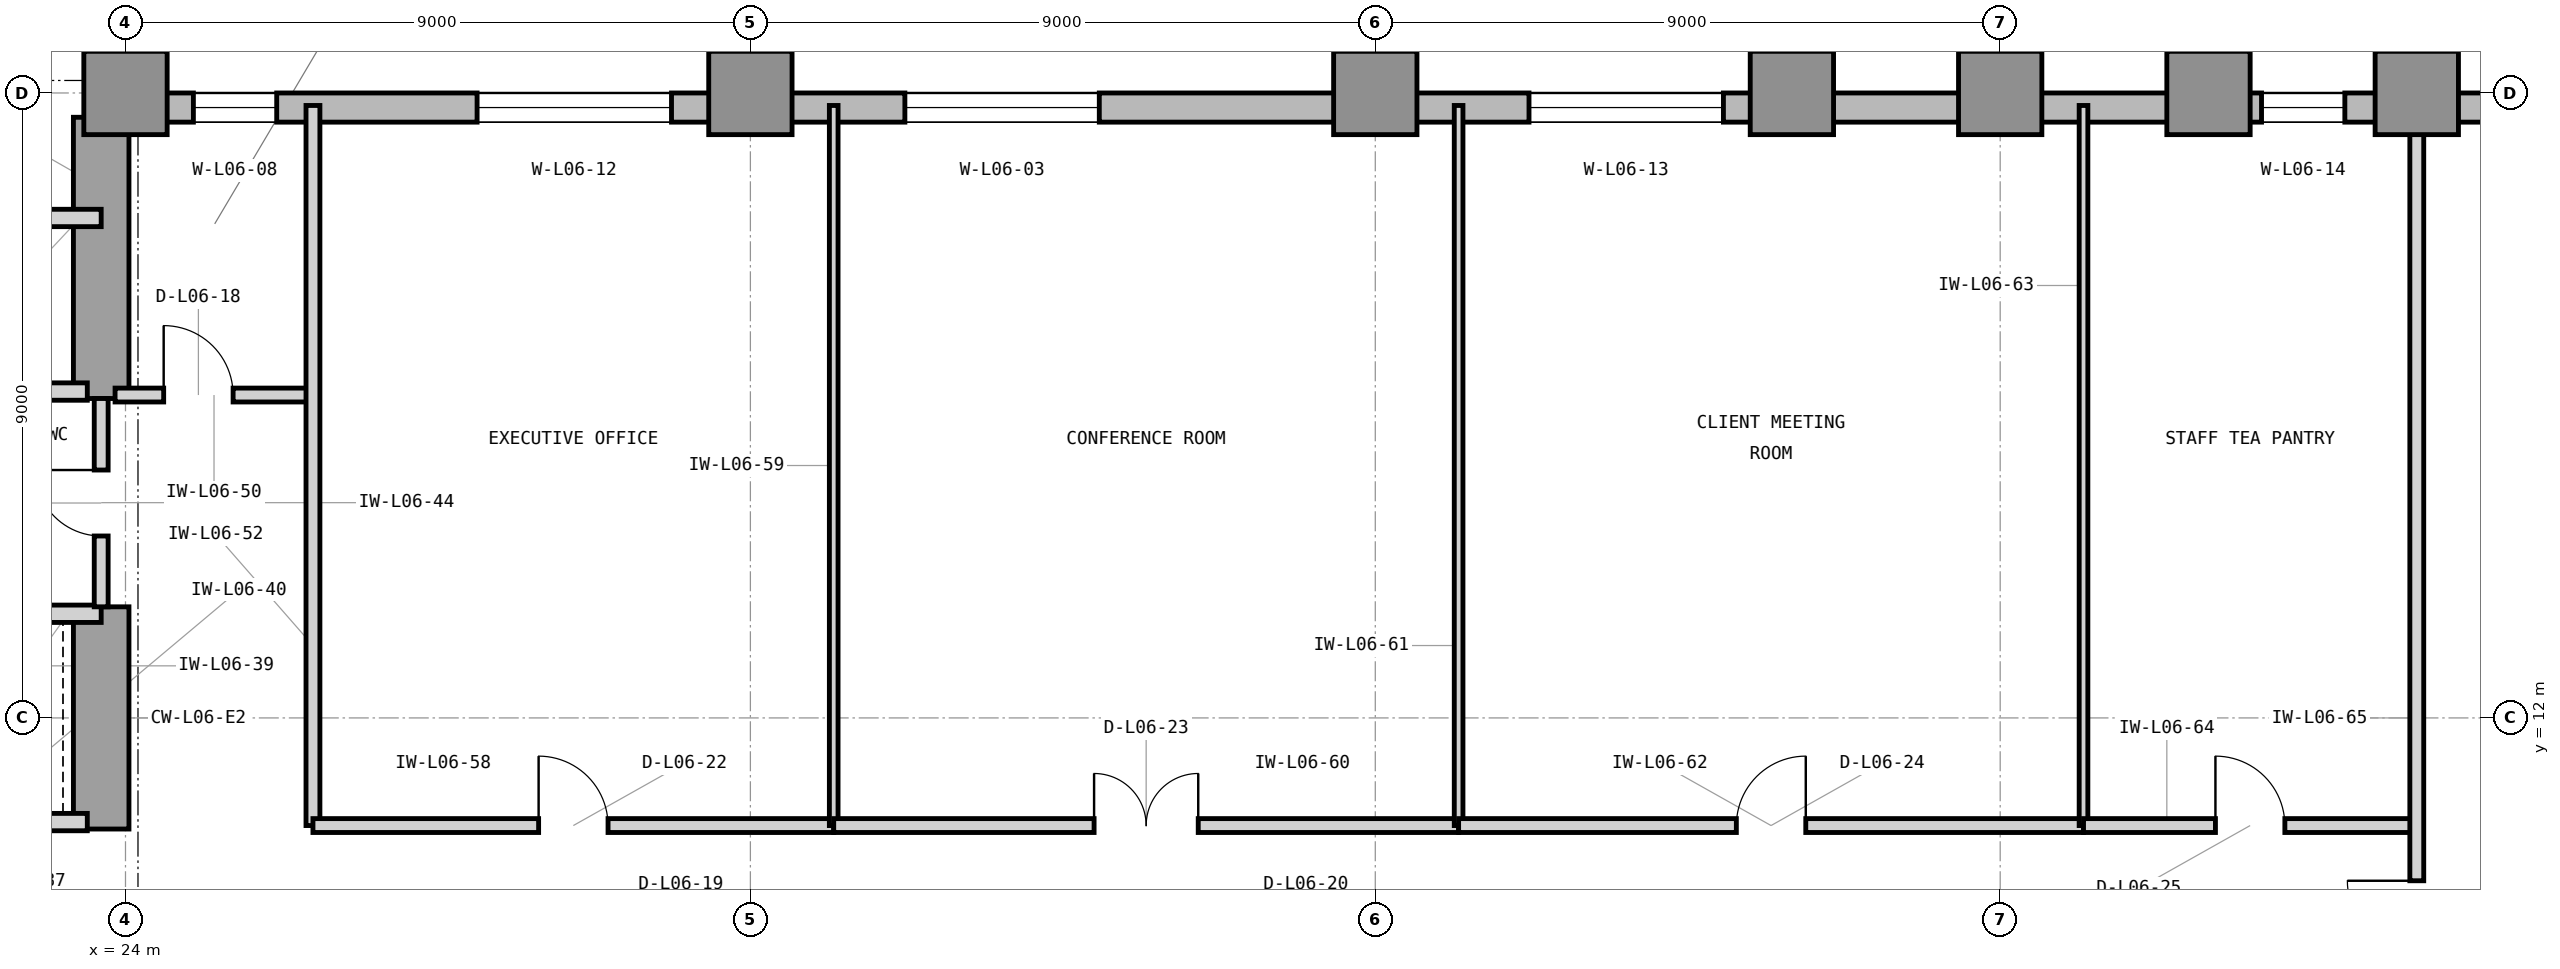
"""IFC4 building model, lengths in metres.
Left out: names, types, materials, properties, quantities, classifications, styles, units other than length and angle.
Written with IfcOpenShell. Run it as: python <this file> out.ifc"""

import sys

from ifc_helpers import new_model, si_unit, direction, frame, frame_2d, origin, origin_2d, place, context, subcontext, project, spatial, rectangle, extrude, element, fill, save


model = new_model("IFC4")
c1 = context("Model", 3, precision=1e-05, world=origin(), true_north=direction((0.0, 1.0)))
c2 = subcontext(c1, "Body", "Model", "MODEL_VIEW")
j1 = project(units=[si_unit("LENGTHUNIT", "METRE"), si_unit("PLANEANGLEUNIT", "RADIAN")], contexts=[c1])
p1 = place(None, origin())
s1 = spatial("IfcSite", under=j1, at=p1, CompositionType="ELEMENT")
p2 = place(p1, origin())
s2 = spatial("IfcBuilding", under=s1, at=p2, CompositionType="ELEMENT")
p3 = place(p2, frame((0.0, 0.0, 30.0)))
s3 = spatial("IfcBuildingStorey", under=s2, at=p3, CompositionType="ELEMENT", Elevation=30.0)
p4 = place(p3, frame((23.65, 10.4, 0.0), z_axis=(0.0, 0.0, 1.0), x_axis=(0.0, 1.0, 0.0)))
e1 = element("IfcWall", 1, at=p4, inside=s3, PredefinedType="SHEAR", context=c2, shape_type="SweptSolid", body=[
    extrude(rectangle(XDim=3.2, YDim=0.8, at=frame_2d((1.6, 0.0))), origin(), (0.0, 0.0, 1.0), 4.2),
])
p5 = place(p3, frame((23.65, 16.6, 0.0), z_axis=(0.0, 0.0, 1.0), x_axis=(0.0, 1.0, 0.0)))
e2 = element("IfcWall", 2, at=p5, inside=s3, PredefinedType="SHEAR", context=c2, shape_type="SweptSolid", body=[
    extrude(rectangle(XDim=4.05, YDim=0.8, at=frame_2d((2.025, 0.0))), origin(), (0.0, 0.0, 1.0), 4.2),
])
for number, where, z_axis, x_axis in (
    (3, (24.0, 21.0, 0.0), (0.0, 0.0, 1.0), (1.0, 0.0, 0.0)),
    (4, (33.0, 21.0, 0.0), (0.0, 0.0, 1.0), (1.0, 0.0, 0.0)),
    (5, (42.0, 21.0, 0.0), (0.0, 0.0, 1.0), (1.0, 0.0, 0.0)),
    (6, (48.0, 21.0, 0.0), (0.0, 0.0, 1.0), (1.0, 0.0, 0.0)),
    (7, (51.0, 21.0, 0.0), (0.0, 0.0, 1.0), (1.0, 0.0, 0.0)),
    (8, (54.0, 21.0, 0.0), (0.0, 0.0, 1.0), (1.0, 0.0, 0.0)),
    (9, (57.0, 21.0, 0.0), (0.0, 0.0, 1.0), (1.0, 0.0, 0.0)),
):
    element("IfcColumn", number, at=place(p3, frame(where, z_axis=z_axis, x_axis=x_axis)), inside=s3, PredefinedType="COLUMN", context=c2, shape_type="SweptSolid", body=[
        extrude(rectangle(XDim=1.2, YDim=1.2, at=origin_2d()), origin(), (0.0, 0.0, 1.0), 4.2),
    ])
p6 = place(p3, frame((64.4, 20.79, 0.0), z_axis=(0.0, 0.0, 1.0), x_axis=(-1.0, 0.0, 0.0)))
e10 = element("IfcWall", 10, at=p6, inside=s3, PredefinedType="STANDARD", context=c2, shape_type="SweptSolid", body=[
    extrude(rectangle(XDim=40.4, YDim=0.42, at=frame_2d((20.2, 0.0))), origin(), (0.0, 0.0, 1.0), 3.98),
])
p7 = place(p6, frame((26.375, 0.0, 0.85)))
e11 = element("IfcOpeningElement", 11, at=p7, cuts=e10, PredefinedType="OPENING", context=c2, shape_type="SweptSolid", body=[
    extrude(rectangle(XDim=2.8, YDim=2.45, at=frame_2d((1.4, 1.225))), frame((0.0, 0.22, 0.0), z_axis=(0.0, -1.0, 0.0), x_axis=(1.0, 0.0, 0.0)), (0.0, 0.0, 1.0), 0.44),
])
p8 = place(p6, frame((38.222, 0.0, 0.85)))
e12 = element("IfcOpeningElement", 12, at=p8, cuts=e10, PredefinedType="OPENING", context=c2, shape_type="SweptSolid", body=[
    extrude(rectangle(XDim=1.2, YDim=2.45, at=frame_2d((0.6, 1.225))), frame((0.0, 0.22, 0.0), z_axis=(0.0, -1.0, 0.0), x_axis=(1.0, 0.0, 0.0)), (0.0, 0.0, 1.0), 0.44),
])
p9 = place(p6, frame((32.536, 0.0, 0.85)))
e13 = element("IfcOpeningElement", 13, at=p9, cuts=e10, PredefinedType="OPENING", context=c2, shape_type="SweptSolid", body=[
    extrude(rectangle(XDim=2.8, YDim=2.45, at=frame_2d((1.4, 1.225))), frame((0.0, 0.22, 0.0), z_axis=(0.0, -1.0, 0.0), x_axis=(1.0, 0.0, 0.0)), (0.0, 0.0, 1.0), 0.44),
])
p10 = place(p6, frame((17.386, 0.0, 0.85)))
e14 = element("IfcOpeningElement", 14, at=p10, cuts=e10, PredefinedType="OPENING", context=c2, shape_type="SweptSolid", body=[
    extrude(rectangle(XDim=2.8, YDim=2.45, at=frame_2d((1.4, 1.225))), frame((0.0, 0.22, 0.0), z_axis=(0.0, -1.0, 0.0), x_axis=(1.0, 0.0, 0.0)), (0.0, 0.0, 1.0), 0.44),
])
p11 = place(p6, frame((8.436, 0.0, 0.85)))
e15 = element("IfcOpeningElement", 15, at=p11, cuts=e10, PredefinedType="OPENING", context=c2, shape_type="SweptSolid", body=[
    extrude(rectangle(XDim=1.2, YDim=2.45, at=frame_2d((0.6, 1.225))), frame((0.0, 0.22, 0.0), z_axis=(0.0, -1.0, 0.0), x_axis=(1.0, 0.0, 0.0)), (0.0, 0.0, 1.0), 0.44),
])
p12 = place(p3, frame((23.79, 21.0, 0.0), z_axis=(0.0, 0.0, 1.0), x_axis=(0.0, 1.0, 0.0)))
e16 = element("IfcWall", 16, at=p12, inside=s3, PredefinedType="STANDARD", context=c2, shape_type="SweptSolid", body=[
    extrude(rectangle(XDim=28.4, YDim=0.42, at=frame_2d((14.2, 0.0))), origin(), (0.0, 0.0, 1.0), 3.98),
])
p13 = place(p12, frame((10.433, 0.0, 0.85)))
e17 = element("IfcOpeningElement", 17, at=p13, cuts=e16, PredefinedType="OPENING", context=c2, shape_type="SweptSolid", body=[
    extrude(rectangle(XDim=2.8, YDim=2.45, at=frame_2d((1.4, 1.225))), frame((0.0, 0.22, 0.0), z_axis=(0.0, -1.0, 0.0), x_axis=(1.0, 0.0, 0.0)), (0.0, 0.0, 1.0), 0.44),
])
p14 = place(p12, frame((21.966, 0.0, 0.85)))
e18 = element("IfcOpeningElement", 18, at=p14, cuts=e16, PredefinedType="OPENING", context=c2, shape_type="SweptSolid", body=[
    extrude(rectangle(XDim=1.2, YDim=2.45, at=frame_2d((0.6, 1.225))), frame((0.0, 0.22, 0.0), z_axis=(0.0, -1.0, 0.0), x_axis=(1.0, 0.0, 0.0)), (0.0, 0.0, 1.0), 0.44),
])
p15 = place(p3, frame((21.05, 16.7, 0.0), z_axis=(0.0, 0.0, 1.0), x_axis=(1.0, 0.0, 0.0)))
e19 = element("IfcWall", 19, at=p15, inside=s3, PredefinedType="PARTITIONING", context=c2, shape_type="SweptSolid", body=[
    extrude(rectangle(XDim=2.4, YDim=0.25, at=frame_2d((1.2, 0.0))), origin(), (0.0, 0.0, 1.0), 3.426),
])
p16 = place(p3, frame((16.45, 19.2, 0.0), z_axis=(0.0, 0.0, 1.0), x_axis=(1.0, 0.0, 0.0)))
e20 = element("IfcWall", 20, at=p16, inside=s3, PredefinedType="PARTITIONING", context=c2, shape_type="SweptSolid", body=[
    extrude(rectangle(XDim=7.2, YDim=0.25, at=frame_2d((3.6, 0.0))), origin(), (0.0, 0.0, 1.0), 3.97),
])
p17 = place(p3, frame((21.05, 10.5, 0.0), z_axis=(0.0, 0.0, 1.0), x_axis=(1.0, 0.0, 0.0)))
e21 = element("IfcWall", 21, at=p17, inside=s3, PredefinedType="PARTITIONING", context=c2, shape_type="SweptSolid", body=[
    extrude(rectangle(XDim=2.4, YDim=0.25, at=frame_2d((1.2, 0.0))), origin(), (0.0, 0.0, 1.0), 3.426),
])
p18 = place(p3, frame((14.7, 13.5, 0.0), z_axis=(0.0, 0.0, 1.0), x_axis=(1.0, 0.0, 0.0)))
e22 = element("IfcWall", 22, at=p18, inside=s3, PredefinedType="PARTITIONING", context=c2, shape_type="SweptSolid", body=[
    extrude(rectangle(XDim=8.95, YDim=0.25, at=frame_2d((4.475, 0.0))), origin(), (0.0, 0.0, 1.0), 3.426),
])
p19 = place(p3, frame((23.65, 13.6, 0.0), z_axis=(0.0, 0.0, 1.0), x_axis=(0.0, 1.0, 0.0)))
e23 = element("IfcWall", 23, at=p19, inside=s3, PredefinedType="PARTITIONING", context=c2, shape_type="SweptSolid", body=[
    extrude(rectangle(XDim=3.0, YDim=0.2, at=frame_2d((1.5, 0.0))), origin(), (0.0, 0.0, 1.0), 3.97),
])
p20 = place(p19, frame((1.02, 0.0, 0.0)))
e24 = element("IfcOpeningElement", 24, at=p20, cuts=e23, PredefinedType="OPENING", context=c2, shape_type="SweptSolid", body=[
    extrude(rectangle(XDim=0.95, YDim=2.1, at=frame_2d((0.475, 1.05))), frame((0.0, 0.11, 0.0), z_axis=(0.0, -1.0, 0.0), x_axis=(1.0, 0.0, 0.0)), (0.0, 0.0, 1.0), 0.22),
])
p21 = place(p3, frame((23.85, 16.65, 0.0), z_axis=(0.0, 0.0, 1.0), x_axis=(1.0, 0.0, 0.0)))
e25 = element("IfcWall", 25, at=p21, inside=s3, PredefinedType="PARTITIONING", context=c2, shape_type="SweptSolid", body=[
    extrude(rectangle(XDim=2.85, YDim=0.2, at=frame_2d((1.425, 0.0))), origin(), (0.0, 0.0, 1.0), 3.97),
])
p22 = place(p21, frame((0.7, 0.0, 0.0)))
e26 = element("IfcOpeningElement", 26, at=p22, cuts=e25, PredefinedType="OPENING", context=c2, shape_type="SweptSolid", body=[
    extrude(rectangle(XDim=1.0, YDim=2.15, at=frame_2d((0.5, 1.075))), frame((0.0, 0.11, 0.0), z_axis=(0.0, -1.0, 0.0), x_axis=(1.0, 0.0, 0.0)), (0.0, 0.0, 1.0), 0.22),
])
p23 = place(p3, frame((26.7, 10.45, 0.0), z_axis=(0.0, 0.0, 1.0), x_axis=(0.0, 1.0, 0.0)))
e27 = element("IfcWall", 27, at=p23, inside=s3, PredefinedType="PARTITIONING", context=c2, shape_type="SweptSolid", body=[
    extrude(rectangle(XDim=10.37, YDim=0.2, at=frame_2d((5.185, 0.0))), origin(), (0.0, 0.0, 1.0), 3.97),
])
p24 = place(p3, frame((26.7, 10.45, 0.0), z_axis=(0.0, 0.0, 1.0), x_axis=(1.0, 0.0, 0.0)))
e28 = element("IfcWall", 28, at=p24, inside=s3, PredefinedType="PARTITIONING", context=c2, shape_type="SweptSolid", body=[
    extrude(rectangle(XDim=7.5, YDim=0.2, at=frame_2d((3.75, 0.0))), origin(), (0.0, 0.0, 1.0), 3.97),
])
p25 = place(p24, frame((3.25, 0.0, 0.0)))
e29 = element("IfcOpeningElement", 29, at=p25, cuts=e28, PredefinedType="OPENING", context=c2, shape_type="SweptSolid", body=[
    extrude(rectangle(XDim=1.0, YDim=2.15, at=frame_2d((0.5, 1.075))), frame((0.0, 0.11, 0.0), z_axis=(0.0, -1.0, 0.0), x_axis=(1.0, 0.0, 0.0)), (0.0, 0.0, 1.0), 0.22),
])
p26 = place(p3, frame((34.2, 10.45, 0.0), z_axis=(0.0, 0.0, 1.0), x_axis=(0.0, 1.0, 0.0)))
e30 = element("IfcWall", 30, at=p26, inside=s3, PredefinedType="PARTITIONING", context=c2, shape_type="SweptSolid", body=[
    extrude(rectangle(XDim=10.37, YDim=0.125, at=frame_2d((5.185, 0.0))), origin(), (0.0, 0.0, 1.0), 3.97),
])
p27 = place(p3, frame((34.2, 10.45, 0.0), z_axis=(0.0, 0.0, 1.0), x_axis=(1.0, 0.0, 0.0)))
e31 = element("IfcWall", 31, at=p27, inside=s3, PredefinedType="PARTITIONING", context=c2, shape_type="SweptSolid", body=[
    extrude(rectangle(XDim=9.0, YDim=0.2, at=frame_2d((4.5, 0.0))), origin(), (0.0, 0.0, 1.0), 3.97),
])
p28 = place(p27, frame((3.75, 0.0, 0.0)))
e32 = element("IfcOpeningElement", 32, at=p28, cuts=e31, PredefinedType="OPENING", context=c2, shape_type="SweptSolid", body=[
    extrude(rectangle(XDim=1.5, YDim=2.3, at=frame_2d((0.75, 1.15))), frame((0.0, 0.11, 0.0), z_axis=(0.0, -1.0, 0.0), x_axis=(1.0, 0.0, 0.0)), (0.0, 0.0, 1.0), 0.22),
])
p29 = place(p3, frame((43.2, 10.45, 0.0), z_axis=(0.0, 0.0, 1.0), x_axis=(0.0, 1.0, 0.0)))
e33 = element("IfcWall", 33, at=p29, inside=s3, PredefinedType="PARTITIONING", context=c2, shape_type="SweptSolid", body=[
    extrude(rectangle(XDim=10.37, YDim=0.125, at=frame_2d((5.185, 0.0))), origin(), (0.0, 0.0, 1.0), 3.97),
])
p30 = place(p3, frame((43.2, 10.45, 0.0), z_axis=(0.0, 0.0, 1.0), x_axis=(1.0, 0.0, 0.0)))
e34 = element("IfcWall", 34, at=p30, inside=s3, PredefinedType="PARTITIONING", context=c2, shape_type="SweptSolid", body=[
    extrude(rectangle(XDim=9.0, YDim=0.2, at=frame_2d((4.5, 0.0))), origin(), (0.0, 0.0, 1.0), 3.97),
])
p31 = place(p30, frame((4.0, 0.0, 0.0)))
e35 = element("IfcOpeningElement", 35, at=p31, cuts=e34, PredefinedType="OPENING", context=c2, shape_type="SweptSolid", body=[
    extrude(rectangle(XDim=1.0, YDim=2.15, at=frame_2d((0.5, 1.075))), frame((0.0, 0.11, 0.0), z_axis=(0.0, -1.0, 0.0), x_axis=(1.0, 0.0, 0.0)), (0.0, 0.0, 1.0), 0.22),
])
p32 = place(p3, frame((52.2, 10.45, 0.0), z_axis=(0.0, 0.0, 1.0), x_axis=(0.0, 1.0, 0.0)))
e36 = element("IfcWall", 36, at=p32, inside=s3, PredefinedType="PARTITIONING", context=c2, shape_type="SweptSolid", body=[
    extrude(rectangle(XDim=10.37, YDim=0.125, at=frame_2d((5.185, 0.0))), origin(), (0.0, 0.0, 1.0), 3.97),
])
p33 = place(p3, frame((52.2, 10.45, 0.0), z_axis=(0.0, 0.0, 1.0), x_axis=(1.0, 0.0, 0.0)))
e37 = element("IfcWall", 37, at=p33, inside=s3, PredefinedType="PARTITIONING", context=c2, shape_type="SweptSolid", body=[
    extrude(rectangle(XDim=4.8, YDim=0.2, at=frame_2d((2.4, 0.0))), origin(), (0.0, 0.0, 1.0), 3.97),
])
p34 = place(p33, frame((1.9, 0.0, 0.0)))
e38 = element("IfcOpeningElement", 38, at=p34, cuts=e37, PredefinedType="OPENING", context=c2, shape_type="SweptSolid", body=[
    extrude(rectangle(XDim=1.0, YDim=2.15, at=frame_2d((0.5, 1.075))), frame((0.0, 0.11, 0.0), z_axis=(0.0, -1.0, 0.0), x_axis=(1.0, 0.0, 0.0)), (0.0, 0.0, 1.0), 0.22),
])
p35 = place(p3, frame((57.0, 3.18, 0.0), z_axis=(0.0, 0.0, 1.0), x_axis=(0.0, 1.0, 0.0)))
e39 = element("IfcWall", 39, at=p35, inside=s3, PredefinedType="PARTITIONING", context=c2, shape_type="SweptSolid", body=[
    extrude(rectangle(XDim=17.64, YDim=0.2, at=frame_2d((8.82, 0.0))), origin(), (0.0, 0.0, 1.0), 3.114),
])
p36 = place(p35, frame((5.475, 0.0, 0.0)))
e40 = element("IfcOpeningElement", 40, at=p36, cuts=e39, PredefinedType="OPENING", context=c2, shape_type="SweptSolid", body=[
    extrude(rectangle(XDim=1.0, YDim=2.15, at=frame_2d((0.5, 1.075))), frame((0.0, 0.11, 0.0), z_axis=(0.0, -1.0, 0.0), x_axis=(1.0, 0.0, 0.0)), (0.0, 0.0, 1.0), 0.22),
])
p37 = place(p7, origin())
e41 = element("IfcWindow", 41, at=p37, inside=s3, PartitioningType="SINGLE_PANEL", PredefinedType="WINDOW", context=c2, shape_type="SweptSolid", body=[
    extrude(rectangle(XDim=2.8, YDim=2.45, at=frame_2d((1.4, 1.225))), frame((0.0, 0.11, 0.0), z_axis=(0.0, -1.0, 0.0), x_axis=(1.0, 0.0, 0.0)), (0.0, 0.0, 1.0), 0.06),
])
fill(e11, e41)
p38 = place(p20, origin())
e42 = element("IfcDoor", 42, at=p38, inside=s3, OperationType="SINGLE_SWING_RIGHT", PredefinedType="DOOR", context=c2, shape_type="SweptSolid", body=[
    extrude(rectangle(XDim=0.95, YDim=2.1, at=frame_2d((0.475, 1.05))), frame((0.0, 0.025, 0.0), z_axis=(0.0, -1.0, 0.0), x_axis=(1.0, 0.0, 0.0)), (0.0, 0.0, 1.0), 0.05),
])
fill(e24, e42)
p39 = place(p22, origin())
e43 = element("IfcDoor", 43, at=p39, inside=s3, OperationType="SINGLE_SWING_LEFT", PredefinedType="DOOR", context=c2, shape_type="SweptSolid", body=[
    extrude(rectangle(XDim=1.0, YDim=2.15, at=frame_2d((0.5, 1.075))), frame((0.0, 0.025, 0.0), z_axis=(0.0, -1.0, 0.0), x_axis=(1.0, 0.0, 0.0)), (0.0, 0.0, 1.0), 0.05),
])
fill(e26, e43)
p40 = place(p25, origin())
e44 = element("IfcDoor", 44, at=p40, inside=s3, OperationType="SINGLE_SWING_LEFT", PredefinedType="DOOR", context=c2, shape_type="SweptSolid", body=[
    extrude(rectangle(XDim=1.0, YDim=2.15, at=frame_2d((0.5, 1.075))), frame((0.0, 0.025, 0.0), z_axis=(0.0, -1.0, 0.0), x_axis=(1.0, 0.0, 0.0)), (0.0, 0.0, 1.0), 0.05),
])
fill(e29, e44)
p41 = place(p28, origin())
e45 = element("IfcDoor", 45, at=p41, inside=s3, OperationType="DOUBLE_DOOR_SINGLE_SWING", PredefinedType="DOOR", context=c2, shape_type="SweptSolid", body=[
    extrude(rectangle(XDim=1.5, YDim=2.3, at=frame_2d((0.75, 1.15))), frame((0.0, 0.025, 0.0), z_axis=(0.0, -1.0, 0.0), x_axis=(1.0, 0.0, 0.0)), (0.0, 0.0, 1.0), 0.05),
])
fill(e32, e45)
p42 = place(p31, origin())
e46 = element("IfcDoor", 46, at=p42, inside=s3, OperationType="SINGLE_SWING_RIGHT", PredefinedType="DOOR", context=c2, shape_type="SweptSolid", body=[
    extrude(rectangle(XDim=1.0, YDim=2.15, at=frame_2d((0.5, 1.075))), frame((0.0, 0.025, 0.0), z_axis=(0.0, -1.0, 0.0), x_axis=(1.0, 0.0, 0.0)), (0.0, 0.0, 1.0), 0.05),
])
fill(e35, e46)
p43 = place(p34, origin())
e47 = element("IfcDoor", 47, at=p43, inside=s3, OperationType="SINGLE_SWING_LEFT", PredefinedType="DOOR", context=c2, shape_type="SweptSolid", body=[
    extrude(rectangle(XDim=1.0, YDim=2.15, at=frame_2d((0.5, 1.075))), frame((0.0, 0.025, 0.0), z_axis=(0.0, -1.0, 0.0), x_axis=(1.0, 0.0, 0.0)), (0.0, 0.0, 1.0), 0.05),
])
fill(e38, e47)
p44 = place(p36, origin())
e48 = element("IfcDoor", 48, at=p44, inside=s3, OperationType="SINGLE_SWING_RIGHT", PredefinedType="DOOR", context=c2, shape_type="SweptSolid", body=[
    extrude(rectangle(XDim=1.0, YDim=2.15, at=frame_2d((0.5, 1.075))), frame((0.0, 0.025, 0.0), z_axis=(0.0, -1.0, 0.0), x_axis=(1.0, 0.0, 0.0)), (0.0, 0.0, 1.0), 0.05),
])
fill(e40, e48)
p45 = place(p8, origin())
e49 = element("IfcWindow", 49, at=p45, inside=s3, PartitioningType="SINGLE_PANEL", PredefinedType="WINDOW", context=c2, shape_type="SweptSolid", body=[
    extrude(rectangle(XDim=1.2, YDim=2.45, at=frame_2d((0.6, 1.225))), frame((0.0, 0.11, 0.0), z_axis=(0.0, -1.0, 0.0), x_axis=(1.0, 0.0, 0.0)), (0.0, 0.0, 1.0), 0.06),
])
fill(e12, e49)
p46 = place(p9, origin())
e50 = element("IfcWindow", 50, at=p46, inside=s3, PartitioningType="SINGLE_PANEL", PredefinedType="WINDOW", context=c2, shape_type="SweptSolid", body=[
    extrude(rectangle(XDim=2.8, YDim=2.45, at=frame_2d((1.4, 1.225))), frame((0.0, 0.11, 0.0), z_axis=(0.0, -1.0, 0.0), x_axis=(1.0, 0.0, 0.0)), (0.0, 0.0, 1.0), 0.06),
])
fill(e13, e50)
p47 = place(p10, origin())
e51 = element("IfcWindow", 51, at=p47, inside=s3, PartitioningType="SINGLE_PANEL", PredefinedType="WINDOW", context=c2, shape_type="SweptSolid", body=[
    extrude(rectangle(XDim=2.8, YDim=2.45, at=frame_2d((1.4, 1.225))), frame((0.0, 0.11, 0.0), z_axis=(0.0, -1.0, 0.0), x_axis=(1.0, 0.0, 0.0)), (0.0, 0.0, 1.0), 0.06),
])
fill(e14, e51)
p48 = place(p11, origin())
e52 = element("IfcWindow", 52, at=p48, inside=s3, PartitioningType="SINGLE_PANEL", PredefinedType="WINDOW", context=c2, shape_type="SweptSolid", body=[
    extrude(rectangle(XDim=1.2, YDim=2.45, at=frame_2d((0.6, 1.225))), frame((0.0, 0.11, 0.0), z_axis=(0.0, -1.0, 0.0), x_axis=(1.0, 0.0, 0.0)), (0.0, 0.0, 1.0), 0.06),
])
fill(e15, e52)
save(model, sys.argv[1])
